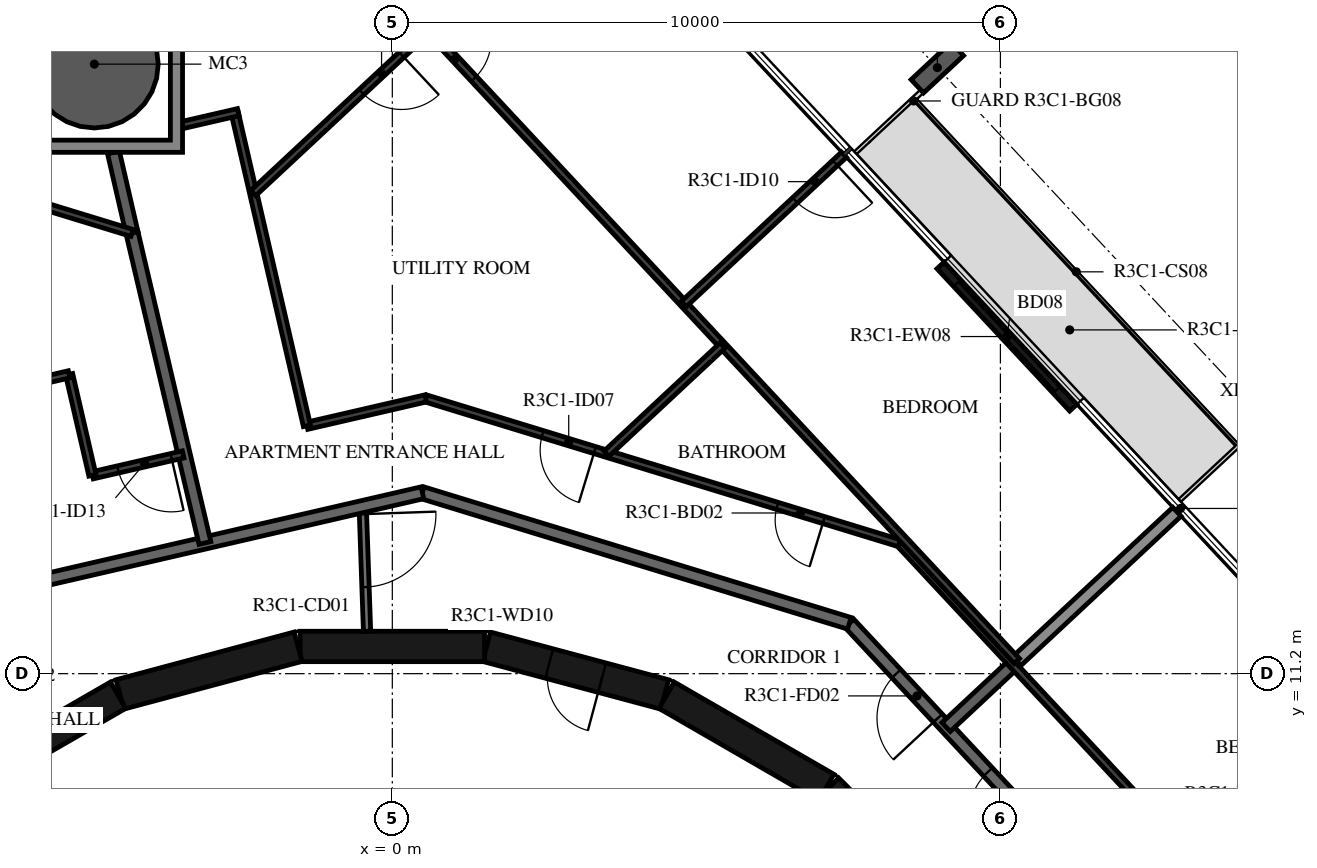
"""IFC4 building model, lengths in metres.
Left out: names, types, materials, properties, quantities, classifications, styles, units other than length and angle.
Written with IfcOpenShell. Run it as: python <this file> out.ifc"""

import sys

from ifc_helpers import new_model, si_unit, direction, frame, frame_2d, origin, origin_2d, place, context, subcontext, project, spatial, polyline, rectangle, hollow_circle, i_section, outline, extrude, element, fill, save


model = new_model("IFC4")
c1 = context("Model", 3, precision=1e-05, world=origin(), true_north=direction((0.0, 1.0)))
c2 = subcontext(c1, "Body", "Model", "MODEL_VIEW")
j1 = project(units=[si_unit("LENGTHUNIT", "METRE"), si_unit("PLANEANGLEUNIT", "RADIAN")], contexts=[c1])
p1 = place(None, origin())
s1 = spatial("IfcSite", under=j1, at=p1, CompositionType="ELEMENT")
p2 = place(p1, origin())
s2 = spatial("IfcBuilding", under=s1, at=p2, CompositionType="ELEMENT")
p3 = place(p2, frame((0.0, 0.0, 137.9)))
s3 = spatial("IfcBuildingStorey", under=s2, at=p3, CompositionType="ELEMENT", Elevation=137.9)
p4 = place(p3, frame((-4.9, 21.223, -0.38), z_axis=(0.0, 0.0, 1.0), x_axis=(1.0, 0.0, 0.0)))
e1 = element("IfcColumn", 1, at=p4, inside=s3, PredefinedType="COLUMN", context=c2, shape_type="SweptSolid", body=[
    extrude(hollow_circle(Radius=1.05, WallThickness=0.05, at=origin_2d()), origin(), (0.0, 0.0, 1.0), 3.5),
])
p5 = place(p3, frame((8.963, 21.167, -0.38), z_axis=(0.0, 0.0, 1.0), x_axis=(0.68199801865, -0.731354019992, 0.0)))
e2 = element("IfcColumn", 2, at=p5, inside=s3, PredefinedType="COLUMN", context=c2, shape_type="SweptSolid", body=[
    extrude(i_section(OverallWidth=0.3, OverallDepth=0.9, WebThickness=0.019, FlangeThickness=0.035, FilletRadius=0.03, at=origin_2d()), origin(), (0.0, 0.0, 1.0), 3.5),
])
p6 = place(p3, frame((11.198, 15.574, 0.0), z_axis=(0.0, 0.0, 1.0), x_axis=(-0.681994703002, 0.731357111866, 0.0)))
e3 = element("IfcWall", 3, at=p6, inside=s3, PredefinedType="STANDARD", context=c2, shape_type="SweptSolid", body=[
    extrude(rectangle(XDim=3.2, YDim=0.16, at=frame_2d((1.6, 0.0))), origin(), (0.0, 0.0, 1.0), 3.12),
])
p7 = place(p6, frame((0.4, 0.0, 0.0)))
e4 = element("IfcOpeningElement", 4, at=p7, cuts=e3, PredefinedType="OPENING", context=c2, shape_type="SweptSolid", body=[
    extrude(rectangle(XDim=2.4, YDim=2.4, at=frame_2d((1.2, 1.2))), frame((0.0, 0.09, 0.0), z_axis=(0.0, -1.0, 0.0), x_axis=(1.0, 0.0, 0.0)), (0.0, 0.0, 1.0), 0.18),
])
p8 = place(p3, frame((9.308, 7.164, 0.0), z_axis=(0.0, 0.0, 1.0), x_axis=(-0.707106781187, 0.707106781187, 0.0)))
e5 = element("IfcWall", 5, at=p8, inside=s3, PredefinedType="SHEAR", context=c2, shape_type="SweptSolid", body=[
    extrude(rectangle(XDim=3.032, YDim=0.5, at=frame_2d((1.516, 0.0))), origin(), (0.0, 0.0, 1.0), 3.12),
])
p9 = place(p8, frame((0.416, 0.0, 0.0)))
e6 = element("IfcOpeningElement", 6, at=p9, cuts=e5, PredefinedType="OPENING", context=c2, shape_type="SweptSolid", body=[
    extrude(rectangle(XDim=1.2, YDim=2.1, at=frame_2d((0.6, 1.05))), frame((0.0, 0.26, 0.0), z_axis=(0.0, -1.0, 0.0), x_axis=(1.0, 0.0, 0.0)), (0.0, 0.0, 1.0), 0.52),
])
p10 = place(p3, frame((7.137, 9.329, 0.0), z_axis=(0.0, 0.0, 1.0), x_axis=(-0.865975092491, 0.500087131594, 0.0)))
e7 = element("IfcWall", 7, at=p10, inside=s3, PredefinedType="SHEAR", context=c2, shape_type="SweptSolid", body=[
    extrude(rectangle(XDim=3.033, YDim=0.5, at=frame_2d((1.516, 0.0))), origin(), (0.0, 0.0, 1.0), 3.12),
])
p11 = place(p3, frame((4.479, 10.858, 0.0), z_axis=(0.0, 0.0, 1.0), x_axis=(-0.965948410781, 0.258734743916, 0.0)))
e8 = element("IfcWall", 8, at=p11, inside=s3, PredefinedType="SHEAR", context=c2, shape_type="SweptSolid", body=[
    extrude(rectangle(XDim=3.033, YDim=0.5, at=frame_2d((1.516, 0.0))), origin(), (0.0, 0.0, 1.0), 3.12),
])
p12 = place(p11, frame((1.066, 0.0, 0.0)))
e9 = element("IfcOpeningElement", 9, at=p12, cuts=e8, PredefinedType="OPENING", context=c2, shape_type="SweptSolid", body=[
    extrude(rectangle(XDim=0.9, YDim=2.1, at=frame_2d((0.45, 1.05))), frame((0.0, 0.26, 0.0), z_axis=(0.0, -1.0, 0.0), x_axis=(1.0, 0.0, 0.0)), (0.0, 0.0, 1.0), 0.52),
])
for number, where, z_axis, x_axis in (
    (10, (1.516, 11.647, 0.0), (0.0, 0.0, 1.0), (-1.0, 0.0, 0.0)),
    (11, (-1.55, 11.643, 0.0), (0.0, 0.0, 1.0), (-0.966, -0.259, 0.0)),
    (12, (-4.51, 10.845, 0.0), (0.0, 0.0, 1.0), (-0.866, -0.5, 0.0)),
):
    element("IfcWall", number, at=place(p3, frame(where, z_axis=z_axis, x_axis=x_axis)), inside=s3, PredefinedType="SHEAR", context=c2, shape_type="SweptSolid", body=[
        extrude(rectangle(XDim=3.033, YDim=0.5, at=frame_2d((1.516, 0.0))), origin(), (0.0, 0.0, 1.0), 3.12),
    ])
p13 = place(p3, frame((-0.487, 13.948, 0.0), z_axis=(0.0, 0.0, 1.0), x_axis=(0.034859752231, -0.999392214135, 0.0)))
e13 = element("IfcWall", 13, at=p13, inside=s3, PredefinedType="PARTITIONING", context=c2, shape_type="SweptSolid", body=[
    extrude(rectangle(XDim=2.052, YDim=0.12, at=frame_2d((1.026, 0.0))), origin(), (0.0, 0.0, 1.0), 3.12),
])
p14 = place(p13, frame((0.125, 0.0, 0.0)))
e14 = element("IfcOpeningElement", 14, at=p14, cuts=e13, PredefinedType="OPENING", context=c2, shape_type="SweptSolid", body=[
    extrude(rectangle(XDim=1.2, YDim=2.1, at=frame_2d((0.6, 1.05))), frame((0.0, 0.07, 0.0), z_axis=(0.0, -1.0, 0.0), x_axis=(1.0, 0.0, 0.0)), (0.0, 0.0, 1.0), 0.14),
])
p15 = place(p3, frame((12.523, 6.659, 0.0), z_axis=(0.0, 0.0, 1.0), x_axis=(-0.682001841105, 0.731350455479, 0.0)))
e15 = element("IfcWall", 15, at=p15, inside=s3, PredefinedType="STANDARD", context=c2, shape_type="SweptSolid", body=[
    extrude(rectangle(XDim=7.342, YDim=0.2, at=frame_2d((3.671, 0.0))), origin(), (0.0, 0.0, 1.0), 3.12),
])
p16 = place(p15, frame((3.0, 0.0, 0.0)))
e16 = element("IfcOpeningElement", 16, at=p16, cuts=e15, PredefinedType="OPENING", context=c2, shape_type="SweptSolid", body=[
    extrude(rectangle(XDim=1.0, YDim=2.1, at=frame_2d((0.5, 1.05))), frame((0.0, 0.11, 0.0), z_axis=(0.0, -1.0, 0.0), x_axis=(1.0, 0.0, 0.0)), (0.0, 0.0, 1.0), 0.22),
])
p17 = place(p15, frame((5.209, 0.0, 0.0)))
e17 = element("IfcOpeningElement", 17, at=p17, cuts=e15, PredefinedType="OPENING", context=c2, shape_type="SweptSolid", body=[
    extrude(rectangle(XDim=1.0, YDim=2.1, at=frame_2d((0.5, 1.05))), frame((0.0, 0.11, 0.0), z_axis=(0.0, -1.0, 0.0), x_axis=(1.0, 0.0, 0.0)), (0.0, 0.0, 1.0), 0.22),
])
p18 = place(p3, frame((7.516, 12.028, 0.0), z_axis=(0.0, 0.0, 1.0), x_axis=(-0.956306642771, 0.292365533182, 0.0)))
e18 = element("IfcWall", 18, at=p18, inside=s3, PredefinedType="STANDARD", context=c2, shape_type="SweptSolid", body=[
    extrude(rectangle(XDim=7.342, YDim=0.2, at=frame_2d((3.671, 0.0))), origin(), (0.0, 0.0, 1.0), 3.12),
])
p19 = place(p3, frame((0.495, 14.175, 0.0), z_axis=(0.0, 0.0, 1.0), x_axis=(-0.974376622151, -0.224922649383, 0.0)))
e19 = element("IfcWall", 19, at=p19, inside=s3, PredefinedType="STANDARD", context=c2, shape_type="SweptSolid", body=[
    extrude(rectangle(XDim=7.342, YDim=0.2, at=frame_2d((3.671, 0.0))), origin(), (0.0, 0.0, 1.0), 3.12),
])
p20 = place(p3, frame((10.233, 11.372, 0.0), z_axis=(0.0, 0.0, 1.0), x_axis=(-0.731329353292, -0.682024469513, 0.0)))
e20 = element("IfcWall", 20, at=p20, inside=s3, PredefinedType="STANDARD", context=c2, shape_type="SweptSolid", body=[
    extrude(rectangle(XDim=1.54, YDim=0.2, at=frame_2d((0.77, 0.0))), origin(), (0.0, 0.0, 1.0), 3.12),
])
p21 = place(p3, frame((12.903, 13.862, 0.0), z_axis=(0.0, 0.0, 1.0), x_axis=(-0.731328084739, -0.682025829769, 0.0)))
e21 = element("IfcWall", 21, at=p21, inside=s3, PredefinedType="STANDARD", context=c2, shape_type="SweptSolid", body=[
    extrude(rectangle(XDim=3.6, YDim=0.2, at=frame_2d((1.8, 0.0))), origin(), (0.0, 0.0, 1.0), 2.73),
])
p22 = place(p3, frame((-4.281, 18.448, 0.0), z_axis=(0.0, 0.0, 1.0), x_axis=(0.228867856942, -0.973457499873, 0.0)))
e22 = element("IfcWall", 22, at=p22, inside=s3, PredefinedType="STANDARD", context=c2, shape_type="SweptSolid", body=[
    extrude(rectangle(XDim=5.238, YDim=0.2, at=frame_2d((2.619, 0.0))), origin(), (0.0, 0.0, 1.0), 3.12),
])
p23 = place(p3, frame((-4.586, 19.771, 0.0), z_axis=(0.0, 0.0, 1.0), x_axis=(0.224898895484, -0.974382105136, 0.0)))
e23 = element("IfcWall", 23, at=p23, inside=s3, PredefinedType="STANDARD", context=c2, shape_type="SweptSolid", body=[
    extrude(rectangle(XDim=1.358, YDim=0.2, at=frame_2d((0.679, 0.0))), origin(), (0.0, 0.0, 1.0), 3.12),
])
p24 = place(p3, frame((13.894, 7.388, 0.0), z_axis=(0.0, 0.0, 1.0), x_axis=(-0.681994622729, 0.731357186721, 0.0)))
e24 = element("IfcWall", 24, at=p24, inside=s3, PredefinedType="PARTITIONING", context=c2, shape_type="SweptSolid", body=[
    extrude(rectangle(XDim=8.146, YDim=0.12, at=frame_2d((4.073, 0.0))), origin(), (0.0, 0.0, 1.0), 3.12),
])
p25 = place(p24, frame((0.2, 0.0, 0.0)))
e25 = element("IfcOpeningElement", 25, at=p25, cuts=e24, PredefinedType="OPENING", context=c2, shape_type="SweptSolid", body=[
    extrude(rectangle(XDim=0.9, YDim=2.1, at=frame_2d((0.45, 1.05))), frame((0.0, 0.07, 0.0), z_axis=(0.0, -1.0, 0.0), x_axis=(1.0, 0.0, 0.0)), (0.0, 0.0, 1.0), 0.14),
])
p26 = place(p3, frame((8.339, 13.345, 0.0), z_axis=(0.0, 0.0, 1.0), x_axis=(-0.956310145342, 0.292354076276, 0.0)))
e26 = element("IfcWall", 26, at=p26, inside=s3, PredefinedType="PARTITIONING", context=c2, shape_type="SweptSolid", body=[
    extrude(rectangle(XDim=8.146, YDim=0.12, at=frame_2d((4.073, 0.0))), origin(), (0.0, 0.0, 1.0), 3.12),
])
p27 = place(p26, frame((1.3, 0.0, 0.0)))
e27 = element("IfcOpeningElement", 27, at=p27, cuts=e26, PredefinedType="OPENING", context=c2, shape_type="SweptSolid", body=[
    extrude(rectangle(XDim=0.8, YDim=2.1, at=frame_2d((0.4, 1.05))), frame((0.0, 0.07, 0.0), z_axis=(0.0, -1.0, 0.0), x_axis=(1.0, 0.0, 0.0)), (0.0, 0.0, 1.0), 0.14),
])
p28 = place(p26, frame((5.237, 0.0, 0.0)))
e28 = element("IfcOpeningElement", 28, at=p28, cuts=e26, PredefinedType="OPENING", context=c2, shape_type="SweptSolid", body=[
    extrude(rectangle(XDim=0.9, YDim=2.1, at=frame_2d((0.45, 1.05))), frame((0.0, 0.07, 0.0), z_axis=(0.0, -1.0, 0.0), x_axis=(1.0, 0.0, 0.0)), (0.0, 0.0, 1.0), 0.14),
])
p29 = place(p3, frame((0.549, 15.727, 0.0), z_axis=(0.0, 0.0, 1.0), x_axis=(-0.97436861061, -0.224957352975, 0.0)))
e29 = element("IfcWall", 29, at=p29, inside=s3, PredefinedType="PARTITIONING", context=c2, shape_type="SweptSolid", body=[
    extrude(rectangle(XDim=2.004, YDim=0.12, at=frame_2d((1.002, 0.0))), origin(), (0.0, 0.0, 1.0), 3.12),
])
p30 = place(p3, frame((-1.404, 15.276, 0.0), z_axis=(0.0, 0.0, 1.0), x_axis=(-0.224947305813, 0.974370930194, 0.0)))
e30 = element("IfcWall", 30, at=p30, inside=s3, PredefinedType="PARTITIONING", context=c2, shape_type="SweptSolid", body=[
    extrude(rectangle(XDim=5.28, YDim=0.12, at=frame_2d((2.64, 0.0))), origin(), (0.0, 0.0, 1.0), 3.12),
])
p31 = place(p3, frame((-2.533, 20.434, 0.0), z_axis=(0.0, 0.0, 1.0), x_axis=(-0.974387124574, -0.224877147491, 0.0)))
e31 = element("IfcWall", 31, at=p31, inside=s3, PredefinedType="PARTITIONING", context=c2, shape_type="SweptSolid", body=[
    extrude(rectangle(XDim=1.011, YDim=0.12, at=frame_2d((0.505, 0.0))), origin(), (0.0, 0.0, 1.0), 3.12),
])
p32 = place(p3, frame((-1.539, 24.071, 0.0), z_axis=(0.0, 0.0, 1.0), x_axis=(0.68200220595, -0.731350115252, 0.0)))
e32 = element("IfcWall", 32, at=p32, inside=s3, PredefinedType="PARTITIONING", context=c2, shape_type="SweptSolid", body=[
    extrude(rectangle(XDim=17.316, YDim=0.12, at=frame_2d((8.658, 0.0))), origin(), (0.0, 0.0, 1.0), 3.12),
])
p33 = place(p32, frame((3.323, 0.0, 0.0)))
e33 = element("IfcOpeningElement", 33, at=p33, cuts=e32, PredefinedType="OPENING", context=c2, shape_type="SweptSolid", body=[
    extrude(rectangle(XDim=0.9, YDim=2.1, at=frame_2d((0.45, 1.05))), frame((0.0, 0.07, 0.0), z_axis=(0.0, -1.0, 0.0), x_axis=(1.0, 0.0, 0.0)), (0.0, 0.0, 1.0), 0.14),
])
p34 = place(p32, frame((0.2, 0.0, 0.0)))
e34 = element("IfcOpeningElement", 34, at=p34, cuts=e32, PredefinedType="OPENING", context=c2, shape_type="SweptSolid", body=[
    extrude(rectangle(XDim=0.9, YDim=2.1, at=frame_2d((0.45, 1.05))), frame((0.0, 0.07, 0.0), z_axis=(0.0, -1.0, 0.0), x_axis=(1.0, 0.0, 0.0)), (0.0, 0.0, 1.0), 0.14),
])
p35 = place(p3, frame((7.427, 19.734, 0.0), z_axis=(0.0, 0.0, 1.0), x_axis=(-0.73139345201, -0.681955730497, 0.0)))
e35 = element("IfcWall", 35, at=p35, inside=s3, PredefinedType="PARTITIONING", context=c2, shape_type="SweptSolid", body=[
    extrude(rectangle(XDim=3.6, YDim=0.12, at=frame_2d((1.8, 0.0))), origin(), (0.0, 0.0, 1.0), 2.73),
])
p36 = place(p35, frame((0.2, 0.0, 0.0)))
e36 = element("IfcOpeningElement", 36, at=p36, cuts=e35, PredefinedType="OPENING", context=c2, shape_type="SweptSolid", body=[
    extrude(rectangle(XDim=0.9, YDim=2.1, at=frame_2d((0.45, 1.05))), frame((0.0, 0.07, 0.0), z_axis=(0.0, -1.0, 0.0), x_axis=(1.0, 0.0, 0.0)), (0.0, 0.0, 1.0), 0.14),
])
p37 = place(p3, frame((5.431, 16.597, 0.0), z_axis=(0.0, 0.0, 1.0), x_axis=(-0.731378807316, -0.681971436505, 0.0)))
e37 = element("IfcWall", 37, at=p37, inside=s3, PredefinedType="PARTITIONING", context=c2, shape_type="SweptSolid", body=[
    extrude(rectangle(XDim=2.609, YDim=0.12, at=frame_2d((1.305, 0.0))), origin(), (0.0, 0.0, 1.0), 3.12),
])
p38 = place(p3, frame((0.591, 21.787, 0.0), z_axis=(0.0, 0.0, 1.0), x_axis=(-0.731364619453, -0.681986651931, 0.0)))
e38 = element("IfcWall", 38, at=p38, inside=s3, PredefinedType="PARTITIONING", context=c2, shape_type="SweptSolid", body=[
    extrude(rectangle(XDim=3.936, YDim=0.12, at=frame_2d((1.968, 0.0))), origin(), (0.0, 0.0, 1.0), 3.12),
])
p39 = place(p38, frame((0.6, 0.0, 0.0)))
e39 = element("IfcOpeningElement", 39, at=p39, cuts=e38, PredefinedType="OPENING", context=c2, shape_type="SweptSolid", body=[
    extrude(rectangle(XDim=0.9, YDim=2.1, at=frame_2d((0.45, 1.05))), frame((0.0, 0.07, 0.0), z_axis=(0.0, -1.0, 0.0), x_axis=(1.0, 0.0, 0.0)), (0.0, 0.0, 1.0), 0.14),
])
p40 = place(p3, frame((-3.44, 14.806, 0.0), z_axis=(0.0, 0.0, 1.0), x_axis=(-0.974356244071, -0.225010910046, 0.0)))
e40 = element("IfcWall", 40, at=p40, inside=s3, PredefinedType="PARTITIONING", context=c2, shape_type="SweptSolid", body=[
    extrude(rectangle(XDim=1.531, YDim=0.12, at=frame_2d((0.766, 0.0))), origin(), (0.0, 0.0, 1.0), 3.12),
])
p41 = place(p40, frame((0.2, 0.0, 0.0)))
e41 = element("IfcOpeningElement", 41, at=p41, cuts=e40, PredefinedType="OPENING", context=c2, shape_type="SweptSolid", body=[
    extrude(rectangle(XDim=0.9, YDim=2.1, at=frame_2d((0.45, 1.05))), frame((0.0, 0.07, 0.0), z_axis=(0.0, -1.0, 0.0), x_axis=(1.0, 0.0, 0.0)), (0.0, 0.0, 1.0), 0.14),
])
p42 = place(p3, frame((-4.931, 14.461, 0.0), z_axis=(0.0, 0.0, 1.0), x_axis=(-0.224911785629, 0.974379129849, 0.0)))
e42 = element("IfcWall", 42, at=p42, inside=s3, PredefinedType="PARTITIONING", context=c2, shape_type="SweptSolid", body=[
    extrude(rectangle(XDim=1.705, YDim=0.12, at=frame_2d((0.853, 0.0))), origin(), (0.0, 0.0, 1.0), 3.12),
])
p43 = place(p3, frame((-5.315, 16.123, 0.0), z_axis=(0.0, 0.0, 1.0), x_axis=(-0.974352456598, -0.225027310168, 0.0)))
e43 = element("IfcWall", 43, at=p43, inside=s3, PredefinedType="PARTITIONING", context=c2, shape_type="SweptSolid", body=[
    extrude(rectangle(XDim=1.7, YDim=0.12, at=frame_2d((0.85, 0.0))), origin(), (0.0, 0.0, 1.0), 3.12),
])
p44 = place(p3, frame((-9.066, 19.91, 0.0), z_axis=(0.0, 0.0, 1.0), x_axis=(0.956313309797, -0.292343724928, 0.0)))
e44 = element("IfcWall", 44, at=p44, inside=s3, PredefinedType="PARTITIONING", context=c2, shape_type="SweptSolid", body=[
    extrude(rectangle(XDim=5.004, YDim=0.12, at=frame_2d((2.502, 0.0))), origin(), (0.0, 0.0, 1.0), 3.12),
])
p45 = place(p44, frame((0.2, 0.0, 0.0)))
e45 = element("IfcOpeningElement", 45, at=p45, cuts=e44, PredefinedType="OPENING", context=c2, shape_type="SweptSolid", body=[
    extrude(rectangle(XDim=0.9, YDim=2.1, at=frame_2d((0.45, 1.05))), frame((0.0, 0.07, 0.0), z_axis=(0.0, -1.0, 0.0), x_axis=(1.0, 0.0, 0.0)), (0.0, 0.0, 1.0), 0.14),
])
p46 = place(p3, origin())
e46 = element("IfcWall", 46, at=p46, inside=s3, PredefinedType="STANDARD", context=c2, shape_type="SweptSolid", body=[
    extrude(outline(polyline([(-3.45, 22.674), (-3.45, 19.773), (-6.35, 19.773), (-6.35, 22.674), (-3.45, 22.674)]), holes=[polyline([(-6.15, 19.973), (-3.65, 19.973), (-3.65, 22.473), (-6.15, 22.473), (-6.15, 19.973)])]), origin(), (0.0, 0.0, 1.0), 3.12),
])
p47 = place(p7, origin())
e47 = element("IfcDoor", 47, at=p47, inside=s3, OperationType="DOUBLE_DOOR_SLIDING", PredefinedType="DOOR", context=c2, shape_type="SweptSolid", body=[
    extrude(rectangle(XDim=2.4, YDim=2.4, at=frame_2d((1.2, 1.2))), frame((0.0, 0.025, 0.0), z_axis=(0.0, -1.0, 0.0), x_axis=(1.0, 0.0, 0.0)), (0.0, 0.0, 1.0), 0.05),
])
fill(e4, e47)
p48 = place(p12, origin())
e48 = element("IfcDoor", 48, at=p48, inside=s3, OperationType="SINGLE_SWING_LEFT", PredefinedType="DOOR", context=c2, shape_type="SweptSolid", body=[
    extrude(rectangle(XDim=0.9, YDim=2.1, at=frame_2d((0.45, 1.05))), frame((0.0, 0.025, 0.0), z_axis=(0.0, -1.0, 0.0), x_axis=(1.0, 0.0, 0.0)), (0.0, 0.0, 1.0), 0.05),
])
fill(e9, e48)
p49 = place(p16, origin())
e49 = element("IfcDoor", 49, at=p49, inside=s3, OperationType="SINGLE_SWING_LEFT", PredefinedType="DOOR", context=c2, shape_type="SweptSolid", body=[
    extrude(rectangle(XDim=1.0, YDim=2.1, at=frame_2d((0.5, 1.05))), frame((0.0, 0.025, 0.0), z_axis=(0.0, -1.0, 0.0), x_axis=(1.0, 0.0, 0.0)), (0.0, 0.0, 1.0), 0.05),
])
fill(e16, e49)
p50 = place(p17, origin())
e50 = element("IfcDoor", 50, at=p50, inside=s3, OperationType="SINGLE_SWING_RIGHT", PredefinedType="DOOR", context=c2, shape_type="SweptSolid", body=[
    extrude(rectangle(XDim=1.0, YDim=2.1, at=frame_2d((0.5, 1.05))), frame((0.0, 0.025, 0.0), z_axis=(0.0, -1.0, 0.0), x_axis=(1.0, 0.0, 0.0)), (0.0, 0.0, 1.0), 0.05),
])
fill(e17, e50)
p51 = place(p27, origin())
e51 = element("IfcDoor", 51, at=p51, inside=s3, OperationType="SINGLE_SWING_RIGHT", PredefinedType="DOOR", context=c2, shape_type="SweptSolid", body=[
    extrude(rectangle(XDim=0.8, YDim=2.1, at=frame_2d((0.4, 1.05))), frame((0.0, 0.025, 0.0), z_axis=(0.0, -1.0, 0.0), x_axis=(1.0, 0.0, 0.0)), (0.0, 0.0, 1.0), 0.05),
])
fill(e27, e51)
p52 = place(p28, origin())
e52 = element("IfcDoor", 52, at=p52, inside=s3, OperationType="SINGLE_SWING_RIGHT", PredefinedType="DOOR", context=c2, shape_type="SweptSolid", body=[
    extrude(rectangle(XDim=0.9, YDim=2.1, at=frame_2d((0.45, 1.05))), frame((0.0, 0.025, 0.0), z_axis=(0.0, -1.0, 0.0), x_axis=(1.0, 0.0, 0.0)), (0.0, 0.0, 1.0), 0.05),
])
fill(e28, e52)
p53 = place(p33, origin())
e53 = element("IfcDoor", 53, at=p53, inside=s3, OperationType="SINGLE_SWING_RIGHT", PredefinedType="DOOR", context=c2, shape_type="SweptSolid", body=[
    extrude(rectangle(XDim=0.9, YDim=2.1, at=frame_2d((0.45, 1.05))), frame((0.0, 0.025, 0.0), z_axis=(0.0, -1.0, 0.0), x_axis=(1.0, 0.0, 0.0)), (0.0, 0.0, 1.0), 0.05),
])
fill(e33, e53)
p54 = place(p39, origin())
e54 = element("IfcDoor", 54, at=p54, inside=s3, OperationType="SINGLE_SWING_RIGHT", PredefinedType="DOOR", context=c2, shape_type="SweptSolid", body=[
    extrude(rectangle(XDim=0.9, YDim=2.1, at=frame_2d((0.45, 1.05))), frame((0.0, 0.025, 0.0), z_axis=(0.0, -1.0, 0.0), x_axis=(1.0, 0.0, 0.0)), (0.0, 0.0, 1.0), 0.05),
])
fill(e39, e54)
p55 = place(p36, origin())
e55 = element("IfcDoor", 55, at=p55, inside=s3, OperationType="SINGLE_SWING_LEFT", PredefinedType="DOOR", context=c2, shape_type="SweptSolid", body=[
    extrude(rectangle(XDim=0.9, YDim=2.1, at=frame_2d((0.45, 1.05))), frame((0.0, 0.025, 0.0), z_axis=(0.0, -1.0, 0.0), x_axis=(1.0, 0.0, 0.0)), (0.0, 0.0, 1.0), 0.05),
])
fill(e36, e55)
p56 = place(p41, origin())
e56 = element("IfcDoor", 56, at=p56, inside=s3, OperationType="SINGLE_SWING_LEFT", PredefinedType="DOOR", context=c2, shape_type="SweptSolid", body=[
    extrude(rectangle(XDim=0.9, YDim=2.1, at=frame_2d((0.45, 1.05))), frame((0.0, 0.025, 0.0), z_axis=(0.0, -1.0, 0.0), x_axis=(1.0, 0.0, 0.0)), (0.0, 0.0, 1.0), 0.05),
])
fill(e41, e56)
p57 = place(p14, origin())
e57 = element("IfcDoor", 57, at=p57, inside=s3, OperationType="DOUBLE_DOOR_SINGLE_SWING", PredefinedType="DOOR", context=c2, shape_type="SweptSolid", body=[
    extrude(rectangle(XDim=1.2, YDim=2.1, at=frame_2d((0.6, 1.05))), frame((0.0, 0.025, 0.0), z_axis=(0.0, -1.0, 0.0), x_axis=(1.0, 0.0, 0.0)), (0.0, 0.0, 1.0), 0.05),
])
fill(e14, e57)
save(model, sys.argv[1])
